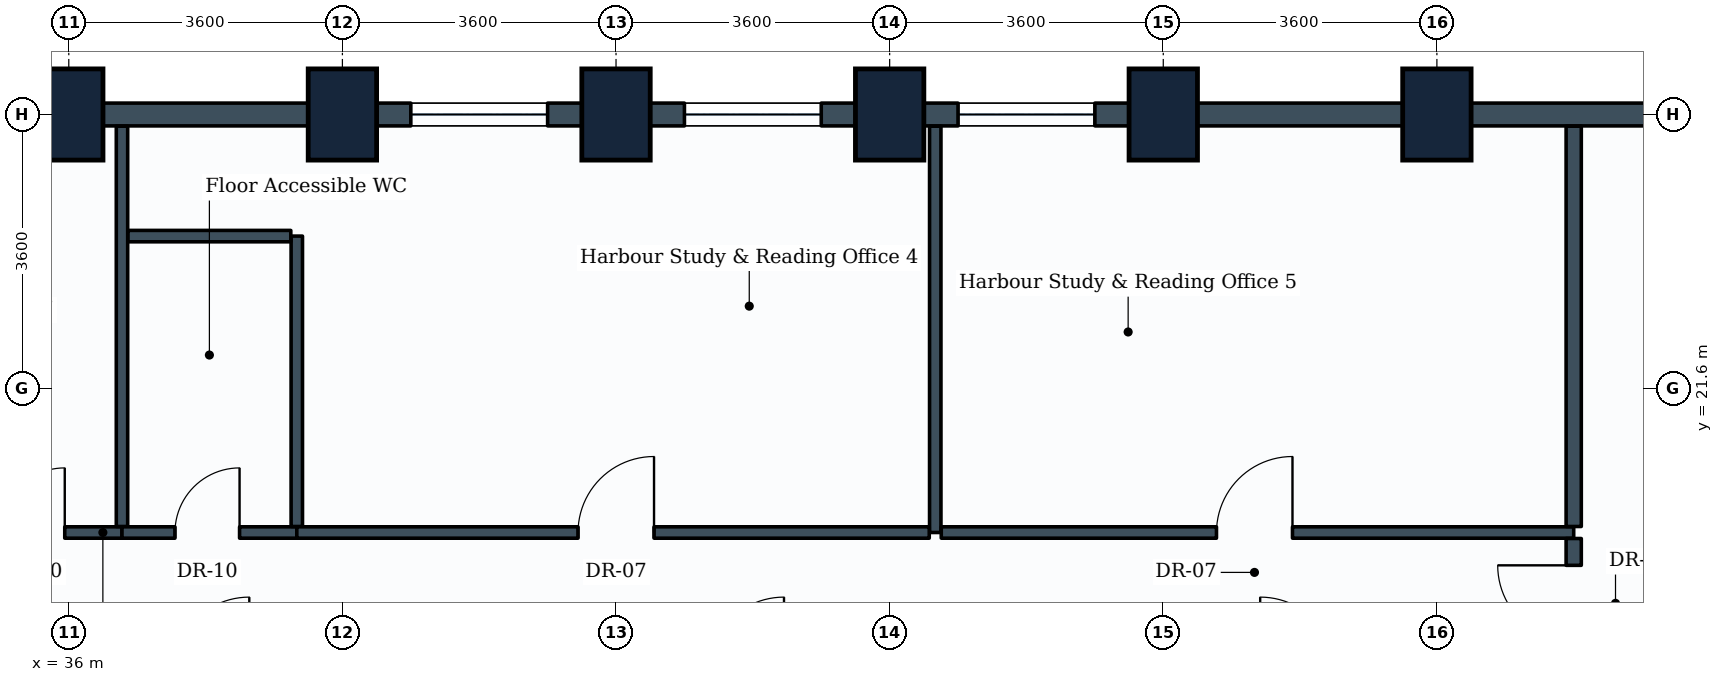
"""IFC4 building model, lengths in metres.
Left out: names, types, materials, properties, quantities, classifications, styles, units other than length and angle.
Written with IfcOpenShell. Run it as: python <this file> out.ifc"""

import sys

from ifc_helpers import new_model, si_unit, direction, frame, frame_2d, origin, origin_2d, place, context, subcontext, project, spatial, rectangle, extrude, element, fill, save


model = new_model("IFC4")
c1 = context("Model", 3, precision=1e-05, world=origin(), true_north=direction((0.0, 1.0)))
c2 = subcontext(c1, "Body", "Model", "MODEL_VIEW")
j1 = project(units=[si_unit("LENGTHUNIT", "METRE"), si_unit("PLANEANGLEUNIT", "RADIAN")], contexts=[c1])
p1 = place(None, origin())
s1 = spatial("IfcSite", under=j1, at=p1, CompositionType="ELEMENT")
p2 = place(p1, origin())
s2 = spatial("IfcBuilding", under=s1, at=p2, CompositionType="ELEMENT")
p3 = place(p2, frame((0.0, 0.0, 55.2)))
s3 = spatial("IfcBuildingStorey", under=s2, at=p3, CompositionType="ELEMENT", Elevation=55.2)
for number, where, z_axis, x_axis in (
    (1, (36.0, 25.2, 0.0), (0.0, 0.0, 1.0), (1.0, 0.0, 0.0)),
    (2, (39.6, 25.2, 0.0), (0.0, 0.0, 1.0), (1.0, 0.0, 0.0)),
    (3, (43.2, 25.2, 0.0), (0.0, 0.0, 1.0), (1.0, 0.0, 0.0)),
    (4, (46.8, 25.2, 0.0), (0.0, 0.0, 1.0), (1.0, 0.0, 0.0)),
    (5, (50.4, 25.2, 0.0), (0.0, 0.0, 1.0), (1.0, 0.0, 0.0)),
    (6, (54.0, 25.2, 0.0), (0.0, 0.0, 1.0), (1.0, 0.0, 0.0)),
):
    element("IfcColumn", number, at=place(p3, frame(where, z_axis=z_axis, x_axis=x_axis)), inside=s3, PredefinedType="COLUMN", context=c2, shape_type="SweptSolid", body=[
        extrude(rectangle(XDim=0.9, YDim=1.2, at=origin_2d()), origin(), (0.0, 0.0, 1.0), 3.9),
    ])
for number, where, z_axis, x_axis in (
    (7, (54.0, 25.2, 0.0), (0.0, 0.0, 1.0), (1.0, 0.0, 0.0)),
    (8, (50.4, 25.2, 0.0), (0.0, 0.0, 1.0), (1.0, 0.0, 0.0)),
):
    element("IfcWall", number, at=place(p3, frame(where, z_axis=z_axis, x_axis=x_axis)), inside=s3, PredefinedType="STANDARD", context=c2, shape_type="SweptSolid", body=[
        extrude(rectangle(XDim=3.6, YDim=0.3, at=frame_2d((1.8, 0.0))), origin(), (0.0, 0.0, 1.0), 2.93),
    ])
p4 = place(p3, frame((46.8, 25.2, 0.0), z_axis=(0.0, 0.0, 1.0), x_axis=(1.0, 0.0, 0.0)))
e9 = element("IfcWall", 9, at=p4, inside=s3, PredefinedType="STANDARD", context=c2, shape_type="SweptSolid", body=[
    extrude(rectangle(XDim=3.6, YDim=0.3, at=frame_2d((1.8, 0.0))), origin(), (0.0, 0.0, 1.0), 2.93),
])
p5 = place(p4, frame((0.9, 0.0, 0.85)))
e10 = element("IfcOpeningElement", 10, at=p5, cuts=e9, PredefinedType="OPENING", context=c2, shape_type="SweptSolid", body=[
    extrude(rectangle(XDim=1.8, YDim=1.35, at=frame_2d((0.9, 0.675))), frame((0.0, 0.16, 0.0), z_axis=(0.0, -1.0, 0.0), x_axis=(1.0, 0.0, 0.0)), (0.0, 0.0, 1.0), 0.32),
])
p6 = place(p3, frame((43.2, 25.2, 0.0), z_axis=(0.0, 0.0, 1.0), x_axis=(1.0, 0.0, 0.0)))
e11 = element("IfcWall", 11, at=p6, inside=s3, PredefinedType="STANDARD", context=c2, shape_type="SweptSolid", body=[
    extrude(rectangle(XDim=3.6, YDim=0.3, at=frame_2d((1.8, 0.0))), origin(), (0.0, 0.0, 1.0), 2.93),
])
p7 = place(p6, frame((0.9, 0.0, 0.85)))
e12 = element("IfcOpeningElement", 12, at=p7, cuts=e11, PredefinedType="OPENING", context=c2, shape_type="SweptSolid", body=[
    extrude(rectangle(XDim=1.8, YDim=1.35, at=frame_2d((0.9, 0.675))), frame((0.0, 0.16, 0.0), z_axis=(0.0, -1.0, 0.0), x_axis=(1.0, 0.0, 0.0)), (0.0, 0.0, 1.0), 0.32),
])
p8 = place(p3, frame((39.6, 25.2, 0.0), z_axis=(0.0, 0.0, 1.0), x_axis=(1.0, 0.0, 0.0)))
e13 = element("IfcWall", 13, at=p8, inside=s3, PredefinedType="STANDARD", context=c2, shape_type="SweptSolid", body=[
    extrude(rectangle(XDim=3.6, YDim=0.3, at=frame_2d((1.8, 0.0))), origin(), (0.0, 0.0, 1.0), 2.93),
])
p9 = place(p8, frame((0.9, 0.0, 0.85)))
e14 = element("IfcOpeningElement", 14, at=p9, cuts=e13, PredefinedType="OPENING", context=c2, shape_type="SweptSolid", body=[
    extrude(rectangle(XDim=1.8, YDim=1.35, at=frame_2d((0.9, 0.675))), frame((0.0, 0.16, 0.0), z_axis=(0.0, -1.0, 0.0), x_axis=(1.0, 0.0, 0.0)), (0.0, 0.0, 1.0), 0.32),
])
for number, where, z_axis, x_axis in (
    (15, (36.0, 25.2, 0.0), (0.0, 0.0, 1.0), (1.0, 0.0, 0.0)),
    (16, (32.4, 25.2, 0.0), (0.0, 0.0, 1.0), (1.0, 0.0, 0.0)),
):
    element("IfcWall", number, at=place(p3, frame(where, z_axis=z_axis, x_axis=x_axis)), inside=s3, PredefinedType="STANDARD", context=c2, shape_type="SweptSolid", body=[
        extrude(rectangle(XDim=3.6, YDim=0.3, at=frame_2d((1.8, 0.0))), origin(), (0.0, 0.0, 1.0), 2.93),
    ])
p10 = place(p3, frame((34.479, 19.7, 0.0), z_axis=(0.0, 0.0, 1.0), x_axis=(1.0, 0.0, 0.0)))
e17 = element("IfcWall", 17, at=p10, inside=s3, PredefinedType="PARTITIONING", context=c2, shape_type="SweptSolid", body=[
    extrude(rectangle(XDim=2.221, YDim=0.15, at=frame_2d((1.11, 0.0))), origin(), (0.0, 0.0, 1.0), 3.08),
])
p11 = place(p10, frame((0.618, 0.0, 0.0)))
e18 = element("IfcOpeningElement", 18, at=p11, cuts=e17, PredefinedType="OPENING", context=c2, shape_type="SweptSolid", body=[
    extrude(rectangle(XDim=0.85, YDim=2.1, at=frame_2d((0.425, 1.05))), frame((0.0, 0.085, 0.0), z_axis=(0.0, -1.0, 0.0), x_axis=(1.0, 0.0, 0.0)), (0.0, 0.0, 1.0), 0.17),
])
p12 = place(p3, frame((36.7, 19.779, 0.0), z_axis=(0.0, 0.0, 1.0), x_axis=(0.0, 1.0, 0.0)))
e19 = element("IfcWall", 19, at=p12, inside=s3, PredefinedType="PARTITIONING", context=c2, shape_type="SweptSolid", body=[
    extrude(rectangle(XDim=5.267, YDim=0.15, at=frame_2d((2.633, 0.0))), origin(), (0.0, 0.0, 1.0), 2.93),
])
p13 = place(p3, frame((36.7, 19.7, 0.0), z_axis=(0.0, 0.0, 1.0), x_axis=(1.0, 0.0, 0.0)))
e20 = element("IfcWall", 20, at=p13, inside=s3, PredefinedType="PARTITIONING", context=c2, shape_type="SweptSolid", body=[
    extrude(rectangle(XDim=2.3, YDim=0.15, at=frame_2d((1.15, 0.0))), origin(), (0.0, 0.0, 1.0), 3.635),
])
p14 = place(p13, frame((0.697, 0.0, 0.0)))
e21 = element("IfcOpeningElement", 21, at=p14, cuts=e20, PredefinedType="OPENING", context=c2, shape_type="SweptSolid", body=[
    extrude(rectangle(XDim=0.85, YDim=2.1, at=frame_2d((0.425, 1.05))), frame((0.0, 0.085, 0.0), z_axis=(0.0, -1.0, 0.0), x_axis=(1.0, 0.0, 0.0)), (0.0, 0.0, 1.0), 0.17),
])
p15 = place(p3, frame((39.0, 19.779, 0.0), z_axis=(0.0, 0.0, 1.0), x_axis=(0.0, 1.0, 0.0)))
e22 = element("IfcWall", 22, at=p15, inside=s3, PredefinedType="PARTITIONING", context=c2, shape_type="SweptSolid", body=[
    extrude(rectangle(XDim=3.821, YDim=0.15, at=frame_2d((1.911, 0.0))), origin(), (0.0, 0.0, 1.0), 3.03),
])
p16 = place(p3, frame((36.779, 23.6, 0.0), z_axis=(0.0, 0.0, 1.0), x_axis=(1.0, 0.0, 0.0)))
e23 = element("IfcWall", 23, at=p16, inside=s3, PredefinedType="PARTITIONING", context=c2, shape_type="SweptSolid", body=[
    extrude(rectangle(XDim=2.142, YDim=0.15, at=frame_2d((1.071, 0.0))), origin(), (0.0, 0.0, 1.0), 3.635),
])
p17 = place(p3, frame((47.4, 19.7, 0.0), z_axis=(0.0, 0.0, 1.0), x_axis=(0.0, 1.0, 0.0)))
e24 = element("IfcWall", 24, at=p17, inside=s3, PredefinedType="PARTITIONING", context=c2, shape_type="SweptSolid", body=[
    extrude(rectangle(XDim=5.346, YDim=0.15, at=frame_2d((2.673, 0.0))), origin(), (0.0, 0.0, 1.0), 2.93),
])
p18 = place(p3, frame((39.0, 19.7, 0.0), z_axis=(0.0, 0.0, 1.0), x_axis=(1.0, 0.0, 0.0)))
e25 = element("IfcWall", 25, at=p18, inside=s3, PredefinedType="PARTITIONING", context=c2, shape_type="SweptSolid", body=[
    extrude(rectangle(XDim=8.321, YDim=0.15, at=frame_2d((4.161, 0.0))), origin(), (0.0, 0.0, 1.0), 3.04),
])
p19 = place(p18, frame((3.7, 0.0, 0.0)))
e26 = element("IfcOpeningElement", 26, at=p19, cuts=e25, PredefinedType="OPENING", context=c2, shape_type="SweptSolid", body=[
    extrude(rectangle(XDim=1.0, YDim=2.1, at=frame_2d((0.5, 1.05))), frame((0.0, 0.085, 0.0), z_axis=(0.0, -1.0, 0.0), x_axis=(1.0, 0.0, 0.0)), (0.0, 0.0, 1.0), 0.17),
])
p20 = place(p3, frame((47.479, 19.7, 0.0), z_axis=(0.0, 0.0, 1.0), x_axis=(1.0, 0.0, 0.0)))
e27 = element("IfcWall", 27, at=p20, inside=s3, PredefinedType="PARTITIONING", context=c2, shape_type="SweptSolid", body=[
    extrude(rectangle(XDim=8.321, YDim=0.15, at=frame_2d((4.161, 0.0))), origin(), (0.0, 0.0, 1.0), 3.04),
])
p21 = place(p20, frame((3.621, 0.0, 0.0)))
e28 = element("IfcOpeningElement", 28, at=p21, cuts=e27, PredefinedType="OPENING", context=c2, shape_type="SweptSolid", body=[
    extrude(rectangle(XDim=1.0, YDim=2.1, at=frame_2d((0.5, 1.05))), frame((0.0, 0.085, 0.0), z_axis=(0.0, -1.0, 0.0), x_axis=(1.0, 0.0, 0.0)), (0.0, 0.0, 1.0), 0.17),
])
p22 = place(p3, frame((55.8, 19.779, 0.0), z_axis=(0.0, 0.0, 1.0), x_axis=(0.0, 1.0, 0.0)))
e29 = element("IfcWall", 29, at=p22, inside=s3, PredefinedType="PARTITIONING", context=c2, shape_type="SweptSolid", body=[
    extrude(rectangle(XDim=5.267, YDim=0.2, at=frame_2d((2.633, 0.0))), origin(), (0.0, 0.0, 1.0), 2.93),
])
p23 = place(p3, frame((55.8, 17.929, 0.0), z_axis=(0.0, 0.0, 1.0), x_axis=(0.0, 1.0, 0.0)))
e30 = element("IfcWall", 30, at=p23, inside=s3, PredefinedType="PARTITIONING", context=c2, shape_type="SweptSolid", body=[
    extrude(rectangle(XDim=1.692, YDim=0.2, at=frame_2d((0.846, 0.0))), origin(), (0.0, 0.0, 1.0), 3.635),
])
p24 = place(p23, frame((0.339, 0.0, 0.0)))
e31 = element("IfcOpeningElement", 31, at=p24, cuts=e30, PredefinedType="OPENING", context=c2, shape_type="SweptSolid", body=[
    extrude(rectangle(XDim=1.0, YDim=2.1, at=frame_2d((0.5, 1.05))), frame((0.0, 0.11, 0.0), z_axis=(0.0, -1.0, 0.0), x_axis=(1.0, 0.0, 0.0)), (0.0, 0.0, 1.0), 0.22),
])
p25 = place(p5, origin())
e32 = element("IfcWindow", 32, at=p25, inside=s3, PartitioningType="SINGLE_PANEL", PredefinedType="WINDOW", context=c2, shape_type="SweptSolid", body=[
    extrude(rectangle(XDim=1.8, YDim=1.35, at=frame_2d((0.9, 0.675))), frame((0.0, 0.03, 0.0), z_axis=(0.0, -1.0, 0.0), x_axis=(1.0, 0.0, 0.0)), (0.0, 0.0, 1.0), 0.06),
])
fill(e10, e32)
p26 = place(p7, origin())
e33 = element("IfcWindow", 33, at=p26, inside=s3, PartitioningType="SINGLE_PANEL", PredefinedType="WINDOW", context=c2, shape_type="SweptSolid", body=[
    extrude(rectangle(XDim=1.8, YDim=1.35, at=frame_2d((0.9, 0.675))), frame((0.0, 0.03, 0.0), z_axis=(0.0, -1.0, 0.0), x_axis=(1.0, 0.0, 0.0)), (0.0, 0.0, 1.0), 0.06),
])
fill(e12, e33)
p27 = place(p9, origin())
e34 = element("IfcWindow", 34, at=p27, inside=s3, PartitioningType="SINGLE_PANEL", PredefinedType="WINDOW", context=c2, shape_type="SweptSolid", body=[
    extrude(rectangle(XDim=1.8, YDim=1.35, at=frame_2d((0.9, 0.675))), frame((0.0, 0.03, 0.0), z_axis=(0.0, -1.0, 0.0), x_axis=(1.0, 0.0, 0.0)), (0.0, 0.0, 1.0), 0.06),
])
fill(e14, e34)
p28 = place(p11, origin())
e35 = element("IfcDoor", 35, at=p28, inside=s3, OperationType="SINGLE_SWING_RIGHT", PredefinedType="DOOR", context=c2, shape_type="SweptSolid", body=[
    extrude(rectangle(XDim=0.85, YDim=2.1, at=frame_2d((0.425, 1.05))), frame((0.0, 0.025, 0.0), z_axis=(0.0, -1.0, 0.0), x_axis=(1.0, 0.0, 0.0)), (0.0, 0.0, 1.0), 0.05),
])
fill(e18, e35)
p29 = place(p14, origin())
e36 = element("IfcDoor", 36, at=p29, inside=s3, OperationType="SINGLE_SWING_RIGHT", PredefinedType="DOOR", context=c2, shape_type="SweptSolid", body=[
    extrude(rectangle(XDim=0.85, YDim=2.1, at=frame_2d((0.425, 1.05))), frame((0.0, 0.025, 0.0), z_axis=(0.0, -1.0, 0.0), x_axis=(1.0, 0.0, 0.0)), (0.0, 0.0, 1.0), 0.05),
])
fill(e21, e36)
p30 = place(p19, origin())
e37 = element("IfcDoor", 37, at=p30, inside=s3, OperationType="SINGLE_SWING_RIGHT", PredefinedType="DOOR", context=c2, shape_type="SweptSolid", body=[
    extrude(rectangle(XDim=1.0, YDim=2.1, at=frame_2d((0.5, 1.05))), frame((0.0, 0.025, 0.0), z_axis=(0.0, -1.0, 0.0), x_axis=(1.0, 0.0, 0.0)), (0.0, 0.0, 1.0), 0.05),
])
fill(e26, e37)
p31 = place(p21, origin())
e38 = element("IfcDoor", 38, at=p31, inside=s3, OperationType="SINGLE_SWING_RIGHT", PredefinedType="DOOR", context=c2, shape_type="SweptSolid", body=[
    extrude(rectangle(XDim=1.0, YDim=2.1, at=frame_2d((0.5, 1.05))), frame((0.0, 0.025, 0.0), z_axis=(0.0, -1.0, 0.0), x_axis=(1.0, 0.0, 0.0)), (0.0, 0.0, 1.0), 0.05),
])
fill(e28, e38)
p32 = place(p24, origin())
e39 = element("IfcDoor", 39, at=p32, inside=s3, OperationType="SINGLE_SWING_RIGHT", PredefinedType="DOOR", context=c2, shape_type="SweptSolid", body=[
    extrude(rectangle(XDim=1.0, YDim=2.1, at=frame_2d((0.5, 1.05))), frame((0.0, 0.025, 0.0), z_axis=(0.0, -1.0, 0.0), x_axis=(1.0, 0.0, 0.0)), (0.0, 0.0, 1.0), 0.05),
])
fill(e31, e39)
save(model, sys.argv[1])
